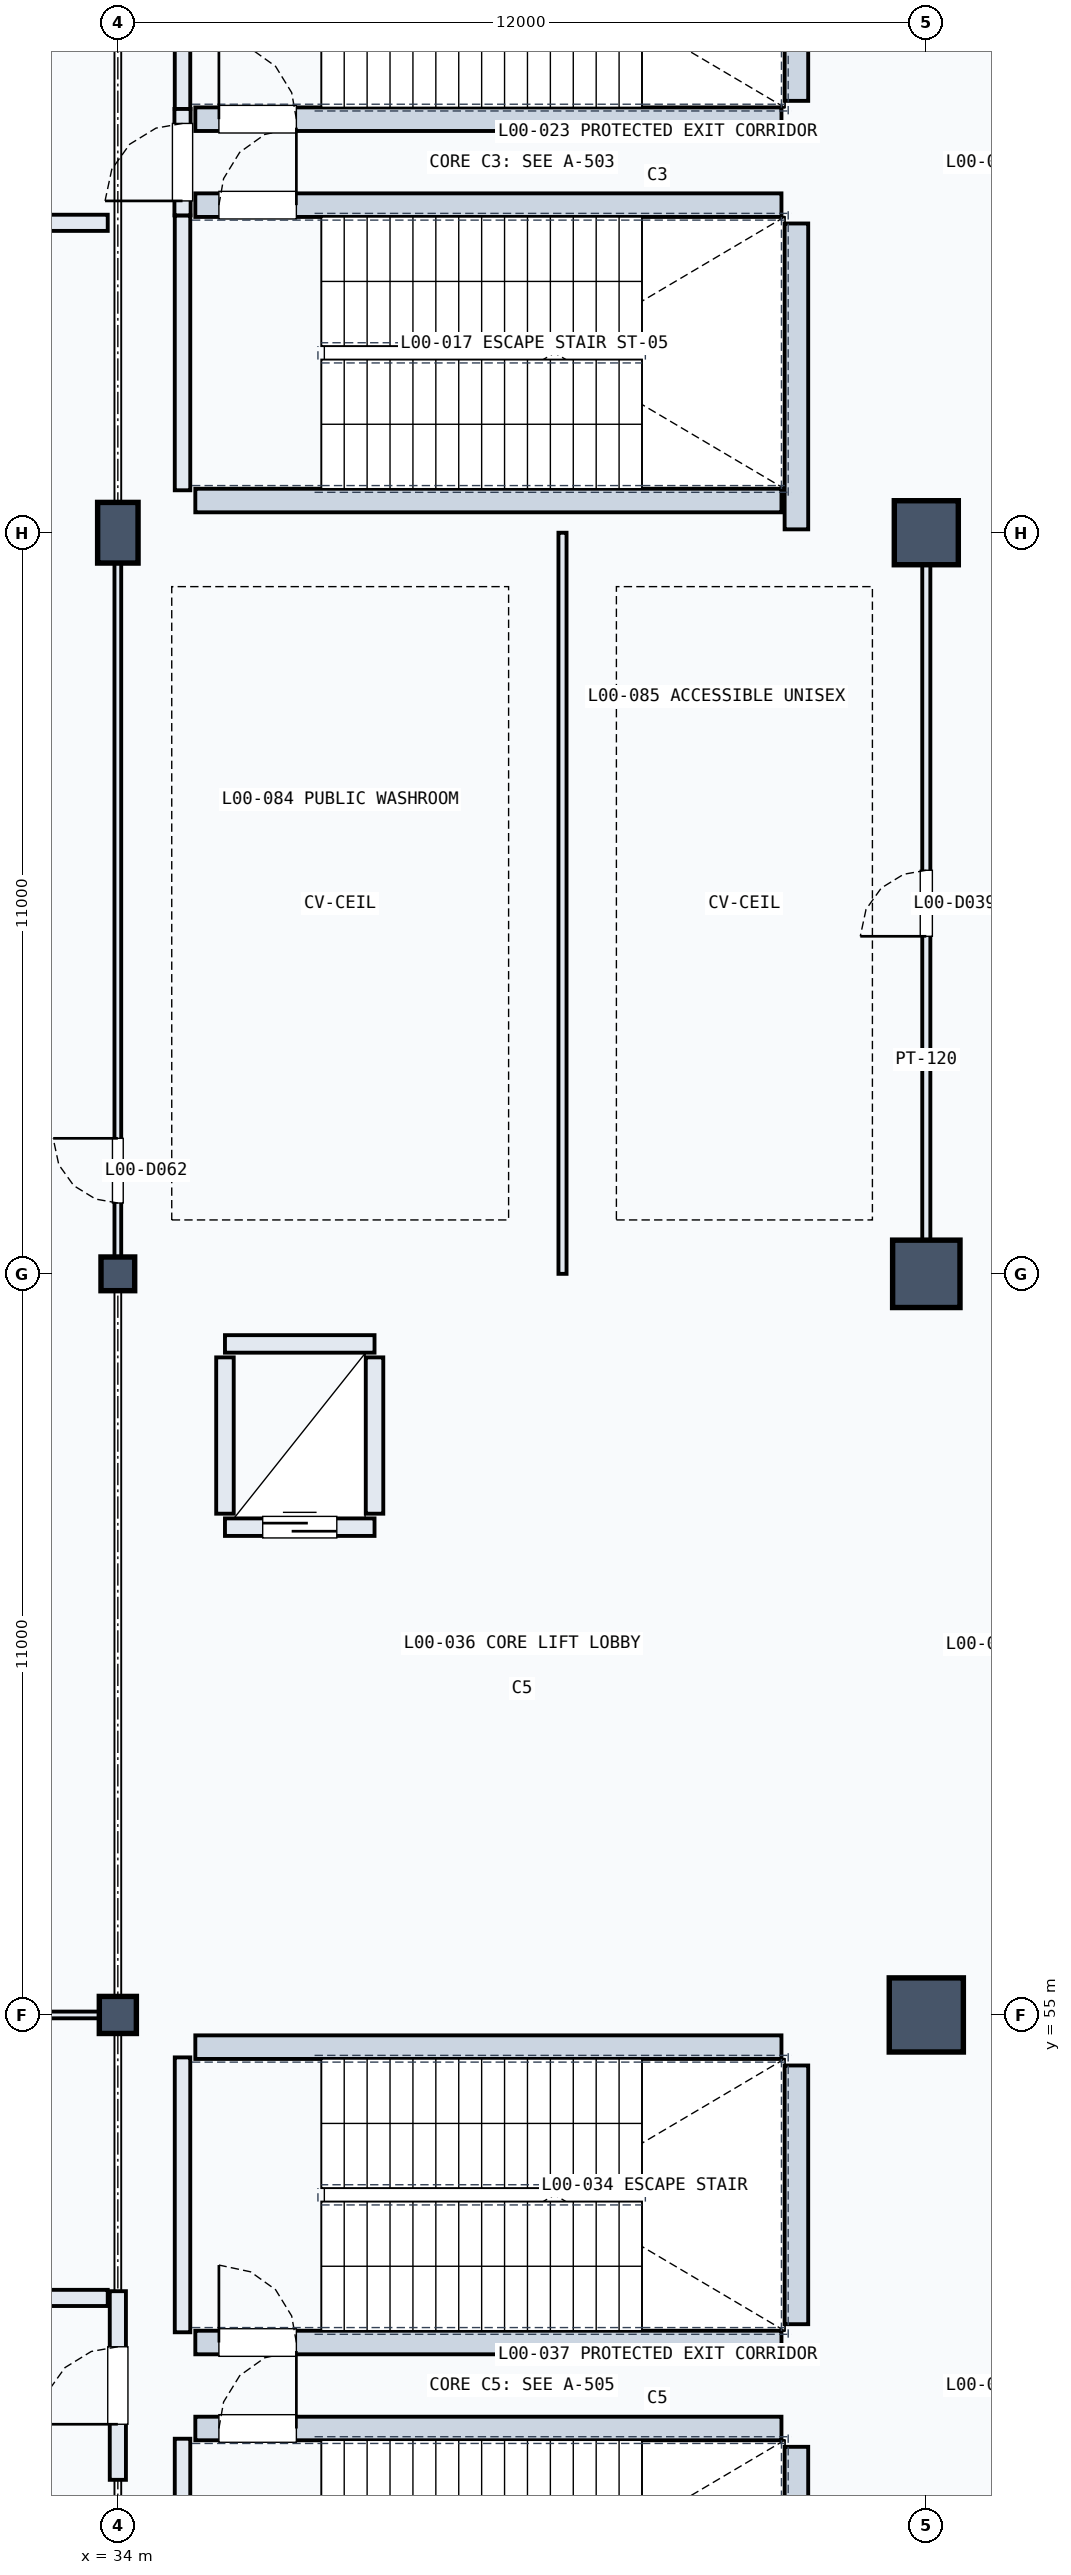
"""IFC4 building model, lengths in metres.
Left out: names, types, materials, properties, quantities, classifications, styles, units other than length and angle.
Written with IfcOpenShell. Run it as: python <this file> out.ifc"""

import sys

from ifc_helpers import new_model, si_unit, direction, frame, frame_2d, origin, origin_2d, place, context, subcontext, project, spatial, rectangle, extrude, element, fill, save


model = new_model("IFC4")
c1 = context("Model", 3, precision=1e-05, world=origin(), true_north=direction((0.0, 1.0)))
c2 = subcontext(c1, "Body", "Model", "MODEL_VIEW")
j1 = project(units=[si_unit("LENGTHUNIT", "METRE"), si_unit("PLANEANGLEUNIT", "RADIAN")], contexts=[c1])
p1 = place(None, origin())
s1 = spatial("IfcSite", under=j1, at=p1, CompositionType="ELEMENT")
p2 = place(p1, origin())
s2 = spatial("IfcBuilding", under=s1, at=p2, CompositionType="ELEMENT")
p3 = place(p2, origin())
s3 = spatial("IfcBuildingStorey", under=s2, at=p3, CompositionType="ELEMENT", Elevation=0.0)
p4 = place(p3, frame((34.0, 55.0, 0.0), z_axis=(0.0, 0.0, 1.0), x_axis=(1.0, 0.0, 0.0)))
e1 = element("IfcColumn", 1, at=p4, inside=s3, PredefinedType="COLUMN", context=c2, shape_type="SweptSolid", body=[
    extrude(rectangle(XDim=0.55, YDim=0.55, at=origin_2d()), origin(), (0.0, 0.0, 1.0), 5.4),
])
p5 = place(p3, frame((34.0, 66.0, 0.0), z_axis=(0.0, 0.0, 1.0), x_axis=(1.0, 0.0, 0.0)))
e2 = element("IfcColumn", 2, at=p5, inside=s3, PredefinedType="COLUMN", context=c2, shape_type="SweptSolid", body=[
    extrude(rectangle(XDim=0.5, YDim=0.5, at=origin_2d()), origin(), (0.0, 0.0, 1.0), 5.4),
])
p6 = place(p3, frame((34.0, 77.0, 0.0), z_axis=(0.0, 0.0, 1.0), x_axis=(1.0, 0.0, 0.0)))
e3 = element("IfcColumn", 3, at=p6, inside=s3, PredefinedType="COLUMN", context=c2, shape_type="SweptSolid", body=[
    extrude(rectangle(XDim=0.6, YDim=0.9, at=origin_2d()), origin(), (0.0, 0.0, 1.0), 5.4),
])
p7 = place(p3, frame((46.0, 55.0, 0.0), z_axis=(0.0, 0.0, 1.0), x_axis=(1.0, 0.0, 0.0)))
e4 = element("IfcColumn", 4, at=p7, inside=s3, PredefinedType="COLUMN", context=c2, shape_type="SweptSolid", body=[
    extrude(rectangle(XDim=1.1, YDim=1.1, at=origin_2d()), origin(), (0.0, 0.0, 1.0), 5.4),
])
p8 = place(p3, frame((46.0, 66.0, 0.0), z_axis=(0.0, 0.0, 1.0), x_axis=(1.0, 0.0, 0.0)))
e5 = element("IfcColumn", 5, at=p8, inside=s3, PredefinedType="COLUMN", context=c2, shape_type="SweptSolid", body=[
    extrude(rectangle(XDim=1.0, YDim=1.0, at=origin_2d()), origin(), (0.0, 0.0, 1.0), 5.4),
])
p9 = place(p3, frame((46.0, 77.0, 0.0), z_axis=(0.0, 0.0, 1.0), x_axis=(1.0, 0.0, 0.0)))
e6 = element("IfcColumn", 6, at=p9, inside=s3, PredefinedType="COLUMN", context=c2, shape_type="SweptSolid", body=[
    extrude(rectangle(XDim=0.95, YDim=0.95, at=origin_2d()), origin(), (0.0, 0.0, 1.0), 5.4),
])
p10 = place(p3, frame((34.96, 77.63, 0.0), z_axis=(0.0, 0.0, 1.0), x_axis=(0.0, 1.0, 0.0)))
e7 = element("IfcWall", 7, at=p10, inside=s3, PredefinedType="SOLIDWALL", context=c2, shape_type="SweptSolid", body=[
    extrude(rectangle(XDim=4.08, YDim=0.23, at=frame_2d((2.04, 0.0))), origin(), (0.0, 0.0, 1.0), 4.45),
])
p11 = place(p3, frame((44.072, 77.05, 0.0), z_axis=(0.0, 0.0, 1.0), x_axis=(0.0, 1.0, 0.0)))
e8 = element("IfcWall", 8, at=p11, inside=s3, PredefinedType="SOLIDWALL", context=c2, shape_type="SweptSolid", body=[
    extrude(rectangle(XDim=4.54, YDim=0.35, at=frame_2d((2.27, 0.0))), origin(), (0.0, 0.0, 1.0), 5.06),
])
p12 = place(p3, frame((35.15, 77.478, 0.0), z_axis=(0.0, 0.0, 1.0), x_axis=(1.0, 0.0, 0.0)))
e9 = element("IfcWall", 9, at=p12, inside=s3, PredefinedType="SOLIDWALL", context=c2, shape_type="SweptSolid", body=[
    extrude(rectangle(XDim=8.7, YDim=0.35, at=frame_2d((4.35, 0.0))), origin(), (0.0, 0.0, 1.0), 5.06),
])
p13 = place(p3, frame((35.15, 81.862, 0.0), z_axis=(0.0, 0.0, 1.0), x_axis=(1.0, 0.0, 0.0)))
e10 = element("IfcWall", 10, at=p13, inside=s3, PredefinedType="SOLIDWALL", context=c2, shape_type="SweptSolid", body=[
    extrude(rectangle(XDim=8.7, YDim=0.35, at=frame_2d((4.35, 0.0))), origin(), (0.0, 0.0, 1.0), 5.06),
])
p14 = place(p13, frame((0.35, 0.0, 0.0)))
e11 = element("IfcOpeningElement", 11, at=p14, cuts=e10, PredefinedType="OPENING", context=c2, shape_type="SweptSolid", body=[
    extrude(rectangle(XDim=1.15, YDim=2.2, at=frame_2d((0.575, 1.1))), frame((0.0, 0.185, 0.0), z_axis=(0.0, -1.0, 0.0), x_axis=(1.0, 0.0, 0.0)), (0.0, 0.0, 1.0), 0.37),
])
p15 = place(p3, frame((34.96, 83.29, 0.0), z_axis=(0.0, 0.0, 1.0), x_axis=(0.0, 1.0, 0.0)))
e12 = element("IfcWall", 12, at=p15, inside=s3, PredefinedType="SOLIDWALL", context=c2, shape_type="SweptSolid", body=[
    extrude(rectangle(XDim=4.08, YDim=0.23, at=frame_2d((2.04, 0.0))), origin(), (0.0, 0.0, 1.0), 4.45),
])
p16 = place(p3, frame((44.072, 83.41, 0.0), z_axis=(0.0, 0.0, 1.0), x_axis=(0.0, 1.0, 0.0)))
e13 = element("IfcWall", 13, at=p16, inside=s3, PredefinedType="SOLIDWALL", context=c2, shape_type="SweptSolid", body=[
    extrude(rectangle(XDim=3.84, YDim=0.35, at=frame_2d((1.92, 0.0))), origin(), (0.0, 0.0, 1.0), 5.06),
])
p17 = place(p3, frame((35.15, 83.138, 0.0), z_axis=(0.0, 0.0, 1.0), x_axis=(1.0, 0.0, 0.0)))
e14 = element("IfcWall", 14, at=p17, inside=s3, PredefinedType="SOLIDWALL", context=c2, shape_type="SweptSolid", body=[
    extrude(rectangle(XDim=8.7, YDim=0.35, at=frame_2d((4.35, 0.0))), origin(), (0.0, 0.0, 1.0), 5.06),
])
p18 = place(p17, frame((0.35, 0.0, 0.0)))
e15 = element("IfcOpeningElement", 15, at=p18, cuts=e14, PredefinedType="OPENING", context=c2, shape_type="SweptSolid", body=[
    extrude(rectangle(XDim=1.15, YDim=2.2, at=frame_2d((0.575, 1.1))), frame((0.0, 0.185, 0.0), z_axis=(0.0, -1.0, 0.0), x_axis=(1.0, 0.0, 0.0)), (0.0, 0.0, 1.0), 0.37),
])
p19 = place(p3, frame((34.96, 44.63, 0.0), z_axis=(0.0, 0.0, 1.0), x_axis=(0.0, 1.0, 0.0)))
e16 = element("IfcWall", 16, at=p19, inside=s3, PredefinedType="SOLIDWALL", context=c2, shape_type="SweptSolid", body=[
    extrude(rectangle(XDim=4.08, YDim=0.23, at=frame_2d((2.04, 0.0))), origin(), (0.0, 0.0, 1.0), 4.45),
])
p20 = place(p3, frame((44.072, 44.05, 0.0), z_axis=(0.0, 0.0, 1.0), x_axis=(0.0, 1.0, 0.0)))
e17 = element("IfcWall", 17, at=p20, inside=s3, PredefinedType="SOLIDWALL", context=c2, shape_type="SweptSolid", body=[
    extrude(rectangle(XDim=4.54, YDim=0.35, at=frame_2d((2.27, 0.0))), origin(), (0.0, 0.0, 1.0), 5.06),
])
p21 = place(p3, frame((35.15, 48.862, 0.0), z_axis=(0.0, 0.0, 1.0), x_axis=(1.0, 0.0, 0.0)))
e18 = element("IfcWall", 18, at=p21, inside=s3, PredefinedType="SOLIDWALL", context=c2, shape_type="SweptSolid", body=[
    extrude(rectangle(XDim=8.7, YDim=0.35, at=frame_2d((4.35, 0.0))), origin(), (0.0, 0.0, 1.0), 5.06),
])
p22 = place(p21, frame((0.35, 0.0, 0.0)))
e19 = element("IfcOpeningElement", 19, at=p22, cuts=e18, PredefinedType="OPENING", context=c2, shape_type="SweptSolid", body=[
    extrude(rectangle(XDim=1.15, YDim=2.2, at=frame_2d((0.575, 1.1))), frame((0.0, 0.185, 0.0), z_axis=(0.0, -1.0, 0.0), x_axis=(1.0, 0.0, 0.0)), (0.0, 0.0, 1.0), 0.37),
])
p23 = place(p3, frame((34.96, 50.29, 0.0), z_axis=(0.0, 0.0, 1.0), x_axis=(0.0, 1.0, 0.0)))
e20 = element("IfcWall", 20, at=p23, inside=s3, PredefinedType="SOLIDWALL", context=c2, shape_type="SweptSolid", body=[
    extrude(rectangle(XDim=4.08, YDim=0.23, at=frame_2d((2.04, 0.0))), origin(), (0.0, 0.0, 1.0), 4.45),
])
p24 = place(p3, frame((44.072, 50.41, 0.0), z_axis=(0.0, 0.0, 1.0), x_axis=(0.0, 1.0, 0.0)))
e21 = element("IfcWall", 21, at=p24, inside=s3, PredefinedType="SOLIDWALL", context=c2, shape_type="SweptSolid", body=[
    extrude(rectangle(XDim=3.84, YDim=0.35, at=frame_2d((1.92, 0.0))), origin(), (0.0, 0.0, 1.0), 5.06),
])
p25 = place(p3, frame((35.15, 50.138, 0.0), z_axis=(0.0, 0.0, 1.0), x_axis=(1.0, 0.0, 0.0)))
e22 = element("IfcWall", 22, at=p25, inside=s3, PredefinedType="SOLIDWALL", context=c2, shape_type="SweptSolid", body=[
    extrude(rectangle(XDim=8.7, YDim=0.35, at=frame_2d((4.35, 0.0))), origin(), (0.0, 0.0, 1.0), 5.06),
])
p26 = place(p25, frame((0.35, 0.0, 0.0)))
e23 = element("IfcOpeningElement", 23, at=p26, cuts=e22, PredefinedType="OPENING", context=c2, shape_type="SweptSolid", body=[
    extrude(rectangle(XDim=1.15, YDim=2.2, at=frame_2d((0.575, 1.1))), frame((0.0, 0.185, 0.0), z_axis=(0.0, -1.0, 0.0), x_axis=(1.0, 0.0, 0.0)), (0.0, 0.0, 1.0), 0.37),
])
p27 = place(p3, frame((35.15, 54.522, 0.0), z_axis=(0.0, 0.0, 1.0), x_axis=(1.0, 0.0, 0.0)))
e24 = element("IfcWall", 24, at=p27, inside=s3, PredefinedType="SOLIDWALL", context=c2, shape_type="SweptSolid", body=[
    extrude(rectangle(XDim=8.7, YDim=0.35, at=frame_2d((4.35, 0.0))), origin(), (0.0, 0.0, 1.0), 5.06),
])
p28 = place(p3, frame((35.59, 62.24, 0.0), z_axis=(0.0, 0.0, 1.0), x_axis=(1.0, 0.0, 0.0)))
e25 = element("IfcWall", 25, at=p28, inside=s3, PredefinedType="SOLIDWALL", context=c2, shape_type="SweptSolid", body=[
    extrude(rectangle(XDim=2.22, YDim=0.26, at=frame_2d((1.11, 0.0))), origin(), (0.0, 0.0, 1.0), 5.06),
])
p29 = place(p28, frame((0.56, 0.0, 0.0)))
e26 = element("IfcOpeningElement", 26, at=p29, cuts=e25, PredefinedType="OPENING", context=c2, shape_type="SweptSolid", body=[
    extrude(rectangle(XDim=1.1, YDim=2.15, at=frame_2d((0.55, 1.075))), frame((0.0, 0.14, 0.0), z_axis=(0.0, -1.0, 0.0), x_axis=(1.0, 0.0, 0.0)), (0.0, 0.0, 1.0), 0.28),
])
p30 = place(p3, frame((35.59, 64.96, 0.0), z_axis=(0.0, 0.0, 1.0), x_axis=(1.0, 0.0, 0.0)))
e27 = element("IfcWall", 27, at=p30, inside=s3, PredefinedType="SOLIDWALL", context=c2, shape_type="SweptSolid", body=[
    extrude(rectangle(XDim=2.22, YDim=0.26, at=frame_2d((1.11, 0.0))), origin(), (0.0, 0.0, 1.0), 5.06),
])
for number, where, z_axis, x_axis in (
    (28, (35.59, 62.44, 0.0), (0.0, 0.0, 1.0), (0.0, 1.0, 0.0)),
    (29, (37.81, 62.44, 0.0), (0.0, 0.0, 1.0), (0.0, 1.0, 0.0)),
):
    element("IfcWall", number, at=place(p3, frame(where, z_axis=z_axis, x_axis=x_axis)), inside=s3, PredefinedType="SOLIDWALL", context=c2, shape_type="SweptSolid", body=[
        extrude(rectangle(XDim=2.32, YDim=0.26, at=frame_2d((1.16, 0.0))), origin(), (0.0, 0.0, 1.0), 5.06),
    ])
p31 = place(p3, frame((22.22, 55.0, 0.0), z_axis=(0.0, 0.0, 1.0), x_axis=(1.0, 0.0, 0.0)))
e30 = element("IfcWall", 30, at=p31, inside=s3, PredefinedType="PARTITIONING", context=c2, shape_type="SweptSolid", body=[
    extrude(rectangle(XDim=11.56, YDim=0.1, at=frame_2d((5.78, 0.0))), origin(), (0.0, 0.0, 1.0), 4.25),
])
p32 = place(p3, frame((46.0, 66.22, 0.0), z_axis=(0.0, 0.0, 1.0), x_axis=(0.0, 1.0, 0.0)))
e31 = element("IfcWall", 31, at=p32, inside=s3, PredefinedType="PARTITIONING", context=c2, shape_type="SweptSolid", body=[
    extrude(rectangle(XDim=10.56, YDim=0.12, at=frame_2d((5.28, 0.0))), origin(), (0.0, 0.0, 1.0), 4.35),
])
p33 = place(p32, frame((4.79, 0.0, 0.0)))
e32 = element("IfcOpeningElement", 32, at=p33, cuts=e31, PredefinedType="OPENING", context=c2, shape_type="SweptSolid", body=[
    extrude(rectangle(XDim=0.98, YDim=2.1, at=frame_2d((0.49, 1.05))), frame((0.0, 0.07, 0.0), z_axis=(0.0, -1.0, 0.0), x_axis=(1.0, 0.0, 0.0)), (0.0, 0.0, 1.0), 0.14),
])
p34 = place(p3, frame((34.0, 66.21, 0.0), z_axis=(0.0, 0.0, 1.0), x_axis=(0.0, 1.0, 0.0)))
e33 = element("IfcWall", 33, at=p34, inside=s3, PredefinedType="PARTITIONING", context=c2, shape_type="SweptSolid", body=[
    extrude(rectangle(XDim=10.57, YDim=0.1, at=frame_2d((5.285, 0.0))), origin(), (0.0, 0.0, 1.0), 4.35),
])
p35 = place(p34, frame((0.841, 0.0, 0.0)))
e34 = element("IfcOpeningElement", 34, at=p35, cuts=e33, PredefinedType="OPENING", context=c2, shape_type="SweptSolid", body=[
    extrude(rectangle(XDim=0.96, YDim=2.15, at=frame_2d((0.48, 1.075))), frame((0.0, 0.06, 0.0), z_axis=(0.0, -1.0, 0.0), x_axis=(1.0, 0.0, 0.0)), (0.0, 0.0, 1.0), 0.12),
])
p36 = place(p3, frame((40.6, 66.0, 0.0), z_axis=(0.0, 0.0, 1.0), x_axis=(0.0, 1.0, 0.0)))
e35 = element("IfcWall", 35, at=p36, inside=s3, PredefinedType="PARTITIONING", context=c2, shape_type="SweptSolid", body=[
    extrude(rectangle(XDim=11.0, YDim=0.12, at=frame_2d((5.5, 0.0))), origin(), (0.0, 0.0, 1.0), 4.35),
])
p37 = place(p3, frame((0.2, 50.8, 0.0), z_axis=(0.0, 0.0, 1.0), x_axis=(1.0, 0.0, 0.0)))
e36 = element("IfcWall", 36, at=p37, inside=s3, PredefinedType="PARTITIONING", context=c2, shape_type="SweptSolid", body=[
    extrude(rectangle(XDim=33.65, YDim=0.24, at=frame_2d((16.825, 0.0))), origin(), (0.0, 0.0, 1.0), 4.25),
])
p38 = place(p37, frame((15.825, 0.0, 0.0)))
e37 = element("IfcOpeningElement", 37, at=p38, cuts=e36, PredefinedType="OPENING", context=c2, shape_type="SweptSolid", body=[
    extrude(rectangle(XDim=2.0, YDim=2.25, at=frame_2d((1.0, 1.125))), frame((0.0, 0.13, 0.0), z_axis=(0.0, -1.0, 0.0), x_axis=(1.0, 0.0, 0.0)), (0.0, 0.0, 1.0), 0.26),
])
p39 = place(p3, frame((28.8, 81.6, 0.0), z_axis=(0.0, 0.0, 1.0), x_axis=(1.0, 0.0, 0.0)))
e38 = element("IfcWall", 38, at=p39, inside=s3, PredefinedType="PARTITIONING", context=c2, shape_type="SweptSolid", body=[
    extrude(rectangle(XDim=5.05, YDim=0.24, at=frame_2d((2.525, 0.0))), origin(), (0.0, 0.0, 1.0), 4.45),
])
p40 = place(p3, frame((34.0, 48.1, 0.0), z_axis=(0.0, 0.0, 1.0), x_axis=(0.0, 1.0, 0.0)))
e39 = element("IfcWall", 39, at=p40, inside=s3, PredefinedType="PARTITIONING", context=c2, shape_type="SweptSolid", body=[
    extrude(rectangle(XDim=2.8, YDim=0.24, at=frame_2d((1.4, 0.0))), origin(), (0.0, 0.0, 1.0), 4.25),
])
p41 = place(p40, frame((0.825, 0.0, 0.0)))
e40 = element("IfcOpeningElement", 40, at=p41, cuts=e39, PredefinedType="OPENING", context=c2, shape_type="SweptSolid", body=[
    extrude(rectangle(XDim=1.15, YDim=2.2, at=frame_2d((0.575, 1.1))), frame((0.0, 0.13, 0.0), z_axis=(0.0, -1.0, 0.0), x_axis=(1.0, 0.0, 0.0)), (0.0, 0.0, 1.0), 0.26),
])
p42 = place(p3, frame((34.96, 81.71, 0.0), z_axis=(0.0, 0.0, 1.0), x_axis=(0.0, 1.0, 0.0)))
e41 = element("IfcWall", 41, at=p42, inside=s3, PredefinedType="PARTITIONING", context=c2, shape_type="SweptSolid", body=[
    extrude(rectangle(XDim=1.58, YDim=0.24, at=frame_2d((0.79, 0.0))), origin(), (0.0, 0.0, 1.0), 4.45),
])
p43 = place(p42, frame((0.215, 0.0, 0.0)))
e42 = element("IfcOpeningElement", 42, at=p43, cuts=e41, PredefinedType="OPENING", context=c2, shape_type="SweptSolid", body=[
    extrude(rectangle(XDim=1.15, YDim=2.2, at=frame_2d((0.575, 1.1))), frame((0.0, 0.13, 0.0), z_axis=(0.0, -1.0, 0.0), x_axis=(1.0, 0.0, 0.0)), (0.0, 0.0, 1.0), 0.26),
])
p44 = place(p14, origin())
e43 = element("IfcDoor", 43, at=p44, inside=s3, OperationType="SINGLE_SWING_RIGHT", PredefinedType="DOOR", context=c2, shape_type="SweptSolid", body=[
    extrude(rectangle(XDim=1.15, YDim=2.2, at=frame_2d((0.575, 1.1))), frame((0.0, 0.025, 0.0), z_axis=(0.0, -1.0, 0.0), x_axis=(1.0, 0.0, 0.0)), (0.0, 0.0, 1.0), 0.05),
])
fill(e11, e43)
p45 = place(p18, origin())
e44 = element("IfcDoor", 44, at=p45, inside=s3, OperationType="SINGLE_SWING_LEFT", PredefinedType="DOOR", context=c2, shape_type="SweptSolid", body=[
    extrude(rectangle(XDim=1.15, YDim=2.2, at=frame_2d((0.575, 1.1))), frame((0.0, 0.025, 0.0), z_axis=(0.0, -1.0, 0.0), x_axis=(1.0, 0.0, 0.0)), (0.0, 0.0, 1.0), 0.05),
])
fill(e15, e44)
p46 = place(p22, origin())
e45 = element("IfcDoor", 45, at=p46, inside=s3, OperationType="SINGLE_SWING_RIGHT", PredefinedType="DOOR", context=c2, shape_type="SweptSolid", body=[
    extrude(rectangle(XDim=1.15, YDim=2.2, at=frame_2d((0.575, 1.1))), frame((0.0, 0.025, 0.0), z_axis=(0.0, -1.0, 0.0), x_axis=(1.0, 0.0, 0.0)), (0.0, 0.0, 1.0), 0.05),
])
fill(e19, e45)
p47 = place(p26, origin())
e46 = element("IfcDoor", 46, at=p47, inside=s3, OperationType="SINGLE_SWING_LEFT", PredefinedType="DOOR", context=c2, shape_type="SweptSolid", body=[
    extrude(rectangle(XDim=1.15, YDim=2.2, at=frame_2d((0.575, 1.1))), frame((0.0, 0.025, 0.0), z_axis=(0.0, -1.0, 0.0), x_axis=(1.0, 0.0, 0.0)), (0.0, 0.0, 1.0), 0.05),
])
fill(e23, e46)
p48 = place(p29, origin())
e47 = element("IfcDoor", 47, at=p48, inside=s3, OperationType="SLIDING_TO_LEFT", PredefinedType="DOOR", context=c2, shape_type="SweptSolid", body=[
    extrude(rectangle(XDim=1.1, YDim=2.15, at=frame_2d((0.55, 1.075))), frame((0.0, 0.025, 0.0), z_axis=(0.0, -1.0, 0.0), x_axis=(1.0, 0.0, 0.0)), (0.0, 0.0, 1.0), 0.05),
])
fill(e26, e47)
p49 = place(p33, origin())
e48 = element("IfcDoor", 48, at=p49, inside=s3, OperationType="SINGLE_SWING_LEFT", PredefinedType="DOOR", context=c2, shape_type="SweptSolid", body=[
    extrude(rectangle(XDim=0.98, YDim=2.1, at=frame_2d((0.49, 1.05))), frame((0.0, 0.025, 0.0), z_axis=(0.0, -1.0, 0.0), x_axis=(1.0, 0.0, 0.0)), (0.0, 0.0, 1.0), 0.05),
])
fill(e32, e48)
p50 = place(p35, origin())
e49 = element("IfcDoor", 49, at=p50, inside=s3, OperationType="SINGLE_SWING_RIGHT", PredefinedType="DOOR", context=c2, shape_type="SweptSolid", body=[
    extrude(rectangle(XDim=0.96, YDim=2.15, at=frame_2d((0.48, 1.075))), frame((0.0, 0.025, 0.0), z_axis=(0.0, -1.0, 0.0), x_axis=(1.0, 0.0, 0.0)), (0.0, 0.0, 1.0), 0.05),
])
fill(e34, e49)
p51 = place(p41, origin())
e50 = element("IfcDoor", 50, at=p51, inside=s3, OperationType="SINGLE_SWING_LEFT", PredefinedType="DOOR", context=c2, shape_type="SweptSolid", body=[
    extrude(rectangle(XDim=1.15, YDim=2.2, at=frame_2d((0.575, 1.1))), frame((0.0, 0.025, 0.0), z_axis=(0.0, -1.0, 0.0), x_axis=(1.0, 0.0, 0.0)), (0.0, 0.0, 1.0), 0.05),
])
fill(e40, e50)
p52 = place(p43, origin())
e51 = element("IfcDoor", 51, at=p52, inside=s3, OperationType="SINGLE_SWING_LEFT", PredefinedType="DOOR", context=c2, shape_type="SweptSolid", body=[
    extrude(rectangle(XDim=1.15, YDim=2.2, at=frame_2d((0.575, 1.1))), frame((0.0, 0.025, 0.0), z_axis=(0.0, -1.0, 0.0), x_axis=(1.0, 0.0, 0.0)), (0.0, 0.0, 1.0), 0.05),
])
fill(e42, e51)
save(model, sys.argv[1])
